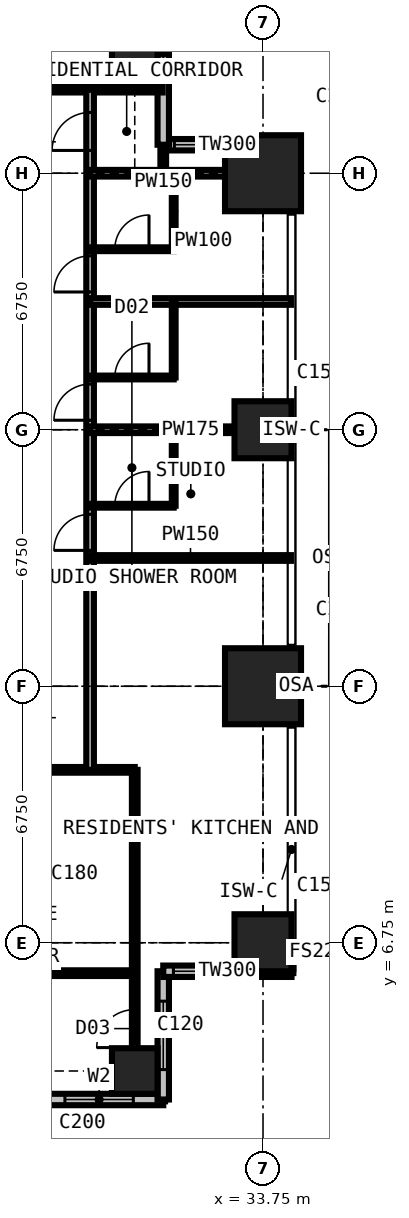
"""IFC4 building model, lengths in metres.
Left out: names, types, materials, properties, quantities, classifications, styles, units other than length and angle.
Written with IfcOpenShell. Run it as: python <this file> out.ifc"""

import sys

from ifc_helpers import new_model, si_unit, direction, frame, frame_2d, origin, origin_2d, place, context, subcontext, project, spatial, rectangle, extrude, element, fill, save


model = new_model("IFC4")
c1 = context("Model", 3, precision=1e-05, world=origin(), true_north=direction((0.0, 1.0)))
c2 = subcontext(c1, "Body", "Model", "MODEL_VIEW")
j1 = project(units=[si_unit("LENGTHUNIT", "METRE"), si_unit("PLANEANGLEUNIT", "RADIAN")], contexts=[c1])
p1 = place(None, origin())
s1 = spatial("IfcSite", under=j1, at=p1, CompositionType="ELEMENT")
p2 = place(p1, origin())
s2 = spatial("IfcBuilding", under=s1, at=p2, CompositionType="ELEMENT")
p3 = place(p2, frame((0.0, 0.0, 145.8)))
s3 = spatial("IfcBuildingStorey", under=s2, at=p3, CompositionType="ELEMENT", Elevation=145.8)
for number, where, z_axis, x_axis in (
    (1, (30.375, 3.375, 0.0), (0.0, 0.0, 1.0), (1.0, 0.0, 0.0)),
    (2, (30.375, 30.375, 0.0), (0.0, 0.0, 1.0), (1.0, 0.0, 0.0)),
):
    element("IfcColumn", number, at=place(p3, frame(where, z_axis=z_axis, x_axis=x_axis)), inside=s3, PredefinedType="COLUMN", context=c2, shape_type="SweptSolid", body=[
        extrude(rectangle(XDim=1.2, YDim=1.2, at=origin_2d()), origin(), (0.0, 0.0, 1.0), 3.6),
    ])
p4 = place(p3, frame((33.75, 6.75, 0.0), z_axis=(0.0, 0.0, 1.0), x_axis=(1.0, 0.0, 0.0)))
e3 = element("IfcColumn", 3, at=p4, inside=s3, PredefinedType="COLUMN", context=c2, shape_type="SweptSolid", body=[
    extrude(rectangle(XDim=1.5, YDim=1.5, at=origin_2d()), origin(), (0.0, 0.0, 1.0), 3.6),
])
p5 = place(p3, frame((33.75, 13.5, 0.0), z_axis=(0.0, 0.0, 1.0), x_axis=(1.0, 0.0, 0.0)))
e4 = element("IfcColumn", 4, at=p5, inside=s3, PredefinedType="COLUMN", context=c2, shape_type="SweptSolid", body=[
    extrude(rectangle(XDim=2.0, YDim=2.0, at=origin_2d()), origin(), (0.0, 0.0, 1.0), 3.6),
])
p6 = place(p3, frame((33.75, 20.25, 0.0), z_axis=(0.0, 0.0, 1.0), x_axis=(1.0, 0.0, 0.0)))
e5 = element("IfcColumn", 5, at=p6, inside=s3, PredefinedType="COLUMN", context=c2, shape_type="SweptSolid", body=[
    extrude(rectangle(XDim=1.5, YDim=1.5, at=origin_2d()), origin(), (0.0, 0.0, 1.0), 3.6),
])
p7 = place(p3, frame((33.75, 27.0, 0.0), z_axis=(0.0, 0.0, 1.0), x_axis=(1.0, 0.0, 0.0)))
e6 = element("IfcColumn", 6, at=p7, inside=s3, PredefinedType="COLUMN", context=c2, shape_type="SweptSolid", body=[
    extrude(rectangle(XDim=2.0, YDim=2.0, at=origin_2d()), origin(), (0.0, 0.0, 1.0), 3.6),
])
p8 = place(p3, frame((34.5, 27.75, 0.0), z_axis=(0.0, 0.0, 1.0), x_axis=(-1.0, 0.0, 0.0)))
e7 = element("IfcWall", 7, at=p8, inside=s3, PredefinedType="SOLIDWALL", context=c2, shape_type="SweptSolid", body=[
    extrude(rectangle(XDim=3.375, YDim=0.3, at=frame_2d((1.688, 0.0))), origin(), (0.0, 0.0, 1.0), 3.375),
])
p9 = place(p8, frame((1.883, 0.0, 0.9)))
e8 = element("IfcOpeningElement", 8, at=p9, cuts=e7, PredefinedType="OPENING", context=c2, shape_type="SweptSolid", body=[
    extrude(rectangle(XDim=1.2, YDim=1.8, at=frame_2d((0.6, 0.9))), frame((0.0, 0.16, 0.0), z_axis=(0.0, -1.0, 0.0), x_axis=(1.0, 0.0, 0.0)), (0.0, 0.0, 1.0), 0.32),
])
p10 = place(p3, frame((31.125, 27.75, 0.0), z_axis=(0.0, 0.0, 1.0), x_axis=(0.0, 1.0, 0.0)))
e9 = element("IfcWall", 9, at=p10, inside=s3, PredefinedType="SOLIDWALL", context=c2, shape_type="SweptSolid", body=[
    extrude(rectangle(XDim=3.375, YDim=0.3, at=frame_2d((1.688, 0.0))), origin(), (0.0, 0.0, 1.0), 3.375),
])
p11 = place(p10, frame((1.663, 0.0, 0.9)))
e10 = element("IfcOpeningElement", 10, at=p11, cuts=e9, PredefinedType="OPENING", context=c2, shape_type="SweptSolid", body=[
    extrude(rectangle(XDim=1.5, YDim=1.8, at=frame_2d((0.75, 0.9))), frame((0.0, 0.16, 0.0), z_axis=(0.0, -1.0, 0.0), x_axis=(1.0, 0.0, 0.0)), (0.0, 0.0, 1.0), 0.32),
])
p12 = place(p3, frame((27.75, 2.625, 0.0), z_axis=(0.0, 0.0, 1.0), x_axis=(1.0, 0.0, 0.0)))
e11 = element("IfcWall", 11, at=p12, inside=s3, PredefinedType="SOLIDWALL", context=c2, shape_type="SweptSolid", body=[
    extrude(rectangle(XDim=3.375, YDim=0.3, at=frame_2d((1.688, 0.0))), origin(), (0.0, 0.0, 1.0), 3.375),
])
p13 = place(p12, frame((0.788, 0.0, 0.6)))
e12 = element("IfcOpeningElement", 12, at=p13, cuts=e11, PredefinedType="OPENING", context=c2, shape_type="SweptSolid", body=[
    extrude(rectangle(XDim=1.8, YDim=2.1, at=frame_2d((0.9, 1.05))), frame((0.0, 0.16, 0.0), z_axis=(0.0, -1.0, 0.0), x_axis=(1.0, 0.0, 0.0)), (0.0, 0.0, 1.0), 0.32),
])
p14 = place(p3, frame((31.125, 2.625, 0.0), z_axis=(0.0, 0.0, 1.0), x_axis=(0.0, 1.0, 0.0)))
e13 = element("IfcWall", 13, at=p14, inside=s3, PredefinedType="SOLIDWALL", context=c2, shape_type="SweptSolid", body=[
    extrude(rectangle(XDim=3.375, YDim=0.3, at=frame_2d((1.688, 0.0))), origin(), (0.0, 0.0, 1.0), 3.375),
])
p15 = place(p14, frame((0.788, 0.0, 0.6)))
e14 = element("IfcOpeningElement", 14, at=p15, cuts=e13, PredefinedType="OPENING", context=c2, shape_type="SweptSolid", body=[
    extrude(rectangle(XDim=1.8, YDim=2.1, at=frame_2d((0.9, 1.05))), frame((0.0, 0.16, 0.0), z_axis=(0.0, -1.0, 0.0), x_axis=(1.0, 0.0, 0.0)), (0.0, 0.0, 1.0), 0.32),
])
p16 = place(p3, frame((31.125, 6.0, 0.0), z_axis=(0.0, 0.0, 1.0), x_axis=(1.0, 0.0, 0.0)))
e15 = element("IfcWall", 15, at=p16, inside=s3, PredefinedType="SOLIDWALL", context=c2, shape_type="SweptSolid", body=[
    extrude(rectangle(XDim=3.375, YDim=0.3, at=frame_2d((1.688, 0.0))), origin(), (0.0, 0.0, 1.0), 3.375),
])
p17 = place(p16, frame((0.268, 0.0, 0.9)))
e16 = element("IfcOpeningElement", 16, at=p17, cuts=e15, PredefinedType="OPENING", context=c2, shape_type="SweptSolid", body=[
    extrude(rectangle(XDim=1.5, YDim=1.8, at=frame_2d((0.75, 0.9))), frame((0.0, 0.16, 0.0), z_axis=(0.0, -1.0, 0.0), x_axis=(1.0, 0.0, 0.0)), (0.0, 0.0, 1.0), 0.32),
])
p18 = place(p3, frame((10.125, 11.3, 0.0), z_axis=(0.0, 0.0, 1.0), x_axis=(1.0, 0.0, 0.0)))
e17 = element("IfcWall", 17, at=p18, inside=s3, PredefinedType="PARTITIONING", context=c2, shape_type="SweptSolid", body=[
    extrude(rectangle(XDim=20.25, YDim=0.15, at=frame_2d((10.125, 0.0))), origin(), (0.0, 0.0, 1.0), 3.375),
])
p19 = place(p18, frame((8.375, 0.0, 0.0)))
e18 = element("IfcOpeningElement", 18, at=p19, cuts=e17, PredefinedType="OPENING", context=c2, shape_type="SweptSolid", body=[
    extrude(rectangle(XDim=1.0, YDim=2.2, at=frame_2d((0.5, 1.1))), frame((0.0, 0.085, 0.0), z_axis=(0.0, -1.0, 0.0), x_axis=(1.0, 0.0, 0.0)), (0.0, 0.0, 1.0), 0.17),
])
p20 = place(p18, frame((10.975, 0.0, 0.0)))
e19 = element("IfcOpeningElement", 19, at=p20, cuts=e17, PredefinedType="OPENING", context=c2, shape_type="SweptSolid", body=[
    extrude(rectangle(XDim=1.0, YDim=2.2, at=frame_2d((0.5, 1.1))), frame((0.0, 0.085, 0.0), z_axis=(0.0, -1.0, 0.0), x_axis=(1.0, 0.0, 0.0)), (0.0, 0.0, 1.0), 0.17),
])
p21 = place(p18, frame((4.875, 0.0, 0.0)))
e20 = element("IfcOpeningElement", 20, at=p21, cuts=e17, PredefinedType="OPENING", context=c2, shape_type="SweptSolid", body=[
    extrude(rectangle(XDim=0.95, YDim=2.2, at=frame_2d((0.475, 1.1))), frame((0.0, 0.085, 0.0), z_axis=(0.0, -1.0, 0.0), x_axis=(1.0, 0.0, 0.0)), (0.0, 0.0, 1.0), 0.17),
])
p22 = place(p3, frame((11.3, 29.2, 0.0), z_axis=(0.0, 0.0, 1.0), x_axis=(1.0, 0.0, 0.0)))
e21 = element("IfcWall", 21, at=p22, inside=s3, PredefinedType="PARTITIONING", context=c2, shape_type="SweptSolid", body=[
    extrude(rectangle(XDim=19.809, YDim=0.15, at=frame_2d((9.904, 0.0))), origin(), (0.0, 0.0, 1.0), 3.375),
])
p23 = place(p22, frame((12.9, 0.0, 0.0)))
e22 = element("IfcOpeningElement", 22, at=p23, cuts=e21, PredefinedType="OPENING", context=c2, shape_type="SweptSolid", body=[
    extrude(rectangle(XDim=1.0, YDim=2.2, at=frame_2d((0.5, 1.1))), frame((0.0, 0.085, 0.0), z_axis=(0.0, -1.0, 0.0), x_axis=(1.0, 0.0, 0.0)), (0.0, 0.0, 1.0), 0.17),
])
p24 = place(p22, frame((5.825, 0.0, 0.0)))
e23 = element("IfcOpeningElement", 23, at=p24, cuts=e21, PredefinedType="OPENING", context=c2, shape_type="SweptSolid", body=[
    extrude(rectangle(XDim=0.95, YDim=2.2, at=frame_2d((0.475, 1.1))), frame((0.0, 0.085, 0.0), z_axis=(0.0, -1.0, 0.0), x_axis=(1.0, 0.0, 0.0)), (0.0, 0.0, 1.0), 0.17),
])
p25 = place(p22, frame((0.6, 0.0, 0.0)))
e24 = element("IfcOpeningElement", 24, at=p25, cuts=e21, PredefinedType="OPENING", context=c2, shape_type="SweptSolid", body=[
    extrude(rectangle(XDim=1.0, YDim=2.2, at=frame_2d((0.5, 1.1))), frame((0.0, 0.085, 0.0), z_axis=(0.0, -1.0, 0.0), x_axis=(1.0, 0.0, 0.0)), (0.0, 0.0, 1.0), 0.17),
])
p26 = place(p3, frame((27.725, 5.95, 0.0), z_axis=(0.0, 0.0, 1.0), x_axis=(1.0, 0.0, 0.0)))
e25 = element("IfcWall", 25, at=p26, inside=s3, PredefinedType="PARTITIONING", context=c2, shape_type="SweptSolid", body=[
    extrude(rectangle(XDim=2.65, YDim=0.15, at=frame_2d((1.325, 0.0))), origin(), (0.0, 0.0, 1.0), 3.375),
])
p27 = place(p3, frame((29.2, 11.3, 0.0), z_axis=(0.0, 0.0, 1.0), x_axis=(0.0, 1.0, 0.0)))
e26 = element("IfcWall", 26, at=p27, inside=s3, PredefinedType="PARTITIONING", context=c2, shape_type="SweptSolid", body=[
    extrude(rectangle(XDim=17.9, YDim=0.2, at=frame_2d((8.95, 0.0))), origin(), (0.0, 0.0, 1.0), 3.375),
])
p28 = place(p27, frame((5.775, 0.0, 0.0)))
e27 = element("IfcOpeningElement", 27, at=p28, cuts=e26, PredefinedType="OPENING", context=c2, shape_type="SweptSolid", body=[
    extrude(rectangle(XDim=0.95, YDim=2.2, at=frame_2d((0.475, 1.1))), frame((0.0, 0.11, 0.0), z_axis=(0.0, -1.0, 0.0), x_axis=(1.0, 0.0, 0.0)), (0.0, 0.0, 1.0), 0.22),
])
p29 = place(p27, frame((9.2, 0.0, 0.0)))
e28 = element("IfcOpeningElement", 28, at=p29, cuts=e26, PredefinedType="OPENING", context=c2, shape_type="SweptSolid", body=[
    extrude(rectangle(XDim=0.95, YDim=2.2, at=frame_2d((0.475, 1.1))), frame((0.0, 0.11, 0.0), z_axis=(0.0, -1.0, 0.0), x_axis=(1.0, 0.0, 0.0)), (0.0, 0.0, 1.0), 0.22),
])
p30 = place(p27, frame((12.575, 0.0, 0.0)))
e29 = element("IfcOpeningElement", 29, at=p30, cuts=e26, PredefinedType="OPENING", context=c2, shape_type="SweptSolid", body=[
    extrude(rectangle(XDim=0.95, YDim=2.2, at=frame_2d((0.475, 1.1))), frame((0.0, 0.11, 0.0), z_axis=(0.0, -1.0, 0.0), x_axis=(1.0, 0.0, 0.0)), (0.0, 0.0, 1.0), 0.22),
])
p31 = place(p27, frame((16.3, 0.0, 0.0)))
e30 = element("IfcOpeningElement", 30, at=p31, cuts=e26, PredefinedType="OPENING", context=c2, shape_type="SweptSolid", body=[
    extrude(rectangle(XDim=1.0, YDim=2.2, at=frame_2d((0.5, 1.1))), frame((0.0, 0.11, 0.0), z_axis=(0.0, -1.0, 0.0), x_axis=(1.0, 0.0, 0.0)), (0.0, 0.0, 1.0), 0.22),
])
p32 = place(p3, frame((29.2, 16.875, 0.0), z_axis=(0.0, 0.0, 1.0), x_axis=(1.0, 0.0, 0.0)))
e31 = element("IfcWall", 31, at=p32, inside=s3, PredefinedType="PARTITIONING", context=c2, shape_type="SweptSolid", body=[
    extrude(rectangle(XDim=5.284, YDim=0.15, at=frame_2d((2.642, 0.0))), origin(), (0.0, 0.0, 1.0), 3.375),
])
p33 = place(p3, frame((29.2, 18.25, 0.0), z_axis=(0.0, 0.0, 1.0), x_axis=(1.0, 0.0, 0.0)))
e32 = element("IfcWall", 32, at=p33, inside=s3, PredefinedType="PARTITIONING", context=c2, shape_type="SweptSolid", body=[
    extrude(rectangle(XDim=2.2, YDim=0.1, at=frame_2d((1.1, 0.0))), origin(), (0.0, 0.0, 1.0), 3.375),
])
p34 = place(p33, frame((0.65, 0.0, 0.0)))
e33 = element("IfcOpeningElement", 33, at=p34, cuts=e32, PredefinedType="OPENING", context=c2, shape_type="SweptSolid", body=[
    extrude(rectangle(XDim=0.9, YDim=2.2, at=frame_2d((0.45, 1.1))), frame((0.0, 0.06, 0.0), z_axis=(0.0, -1.0, 0.0), x_axis=(1.0, 0.0, 0.0)), (0.0, 0.0, 1.0), 0.12),
])
p35 = place(p3, frame((29.2, 20.25, 0.0), z_axis=(0.0, 0.0, 1.0), x_axis=(1.0, 0.0, 0.0)))
e34 = element("IfcWall", 34, at=p35, inside=s3, PredefinedType="PARTITIONING", context=c2, shape_type="SweptSolid", body=[
    extrude(rectangle(XDim=5.284, YDim=0.175, at=frame_2d((2.642, 0.0))), origin(), (0.0, 0.0, 1.0), 2.61),
])
p36 = place(p3, frame((29.2, 21.625, 0.0), z_axis=(0.0, 0.0, 1.0), x_axis=(1.0, 0.0, 0.0)))
e35 = element("IfcWall", 35, at=p36, inside=s3, PredefinedType="PARTITIONING", context=c2, shape_type="SweptSolid", body=[
    extrude(rectangle(XDim=2.2, YDim=0.1, at=frame_2d((1.1, 0.0))), origin(), (0.0, 0.0, 1.0), 3.375),
])
p37 = place(p36, frame((0.65, 0.0, 0.0)))
e36 = element("IfcOpeningElement", 36, at=p37, cuts=e35, PredefinedType="OPENING", context=c2, shape_type="SweptSolid", body=[
    extrude(rectangle(XDim=0.9, YDim=2.2, at=frame_2d((0.45, 1.1))), frame((0.0, 0.06, 0.0), z_axis=(0.0, -1.0, 0.0), x_axis=(1.0, 0.0, 0.0)), (0.0, 0.0, 1.0), 0.12),
])
p38 = place(p3, frame((29.2, 23.625, 0.0), z_axis=(0.0, 0.0, 1.0), x_axis=(1.0, 0.0, 0.0)))
e37 = element("IfcWall", 37, at=p38, inside=s3, PredefinedType="PARTITIONING", context=c2, shape_type="SweptSolid", body=[
    extrude(rectangle(XDim=5.284, YDim=0.175, at=frame_2d((2.642, 0.0))), origin(), (0.0, 0.0, 1.0), 3.375),
])
p39 = place(p3, frame((29.2, 25.0, 0.0), z_axis=(0.0, 0.0, 1.0), x_axis=(1.0, 0.0, 0.0)))
e38 = element("IfcWall", 38, at=p39, inside=s3, PredefinedType="PARTITIONING", context=c2, shape_type="SweptSolid", body=[
    extrude(rectangle(XDim=2.2, YDim=0.1, at=frame_2d((1.1, 0.0))), origin(), (0.0, 0.0, 1.0), 3.375),
])
p40 = place(p39, frame((0.65, 0.0, 0.0)))
e39 = element("IfcOpeningElement", 39, at=p40, cuts=e38, PredefinedType="OPENING", context=c2, shape_type="SweptSolid", body=[
    extrude(rectangle(XDim=0.9, YDim=2.2, at=frame_2d((0.45, 1.1))), frame((0.0, 0.06, 0.0), z_axis=(0.0, -1.0, 0.0), x_axis=(1.0, 0.0, 0.0)), (0.0, 0.0, 1.0), 0.12),
])
p41 = place(p3, frame((29.2, 27.0, 0.0), z_axis=(0.0, 0.0, 1.0), x_axis=(1.0, 0.0, 0.0)))
e40 = element("IfcWall", 40, at=p41, inside=s3, PredefinedType="PARTITIONING", context=c2, shape_type="SweptSolid", body=[
    extrude(rectangle(XDim=5.284, YDim=0.175, at=frame_2d((2.642, 0.0))), origin(), (0.0, 0.0, 1.0), 2.806),
])
p42 = place(p3, frame((30.375, 2.775, 0.0), z_axis=(0.0, 0.0, 1.0), x_axis=(0.0, 1.0, 0.0)))
e41 = element("IfcWall", 41, at=p42, inside=s3, PredefinedType="PARTITIONING", context=c2, shape_type="SweptSolid", body=[
    extrude(rectangle(XDim=8.525, YDim=0.15, at=frame_2d((4.263, 0.0))), origin(), (0.0, 0.0, 1.0), 2.877),
])
p43 = place(p42, frame((1.216, 0.0, 0.0)))
e42 = element("IfcOpeningElement", 42, at=p43, cuts=e41, PredefinedType="OPENING", context=c2, shape_type="SweptSolid", body=[
    extrude(rectangle(XDim=1.0, YDim=2.2, at=frame_2d((0.5, 1.1))), frame((0.0, 0.085, 0.0), z_axis=(0.0, -1.0, 0.0), x_axis=(1.0, 0.0, 0.0)), (0.0, 0.0, 1.0), 0.17),
])
p44 = place(p3, frame((31.125, 27.0, 0.0), z_axis=(0.0, 0.0, 1.0), x_axis=(0.0, 1.0, 0.0)))
e43 = element("IfcWall", 43, at=p44, inside=s3, PredefinedType="PARTITIONING", context=c2, shape_type="SweptSolid", body=[
    extrude(rectangle(XDim=0.734, YDim=0.15, at=frame_2d((0.367, 0.0))), origin(), (0.0, 0.0, 1.0), 3.375),
])
for number, where, z_axis, x_axis in (
    (44, (31.4, 18.25, 0.0), (0.0, 0.0, 1.0), (0.0, 1.0, 0.0)),
    (45, (31.4, 21.625, 0.0), (0.0, 0.0, 1.0), (0.0, 1.0, 0.0)),
    (46, (31.4, 25.0, 0.0), (0.0, 0.0, 1.0), (0.0, 1.0, 0.0)),
):
    element("IfcWall", number, at=place(p3, frame(where, z_axis=z_axis, x_axis=x_axis)), inside=s3, PredefinedType="PARTITIONING", context=c2, shape_type="SweptSolid", body=[
        extrude(rectangle(XDim=2.0, YDim=0.1, at=frame_2d((1.0, 0.0))), origin(), (0.0, 0.0, 1.0), 3.375),
    ])
p45 = place(p9, origin())
e47 = element("IfcWindow", 47, at=p45, inside=s3, PartitioningType="SINGLE_PANEL", PredefinedType="WINDOW", context=c2, shape_type="SweptSolid", body=[
    extrude(rectangle(XDim=1.2, YDim=1.8, at=frame_2d((0.6, 0.9))), frame((0.0, 0.03, 0.0), z_axis=(0.0, -1.0, 0.0), x_axis=(1.0, 0.0, 0.0)), (0.0, 0.0, 1.0), 0.06),
])
fill(e8, e47)
p46 = place(p11, origin())
e48 = element("IfcWindow", 48, at=p46, inside=s3, PartitioningType="SINGLE_PANEL", PredefinedType="WINDOW", context=c2, shape_type="SweptSolid", body=[
    extrude(rectangle(XDim=1.5, YDim=1.8, at=frame_2d((0.75, 0.9))), frame((0.0, 0.03, 0.0), z_axis=(0.0, -1.0, 0.0), x_axis=(1.0, 0.0, 0.0)), (0.0, 0.0, 1.0), 0.06),
])
fill(e10, e48)
p47 = place(p13, origin())
e49 = element("IfcWindow", 49, at=p47, inside=s3, PartitioningType="SINGLE_PANEL", PredefinedType="WINDOW", context=c2, shape_type="SweptSolid", body=[
    extrude(rectangle(XDim=1.8, YDim=2.1, at=frame_2d((0.9, 1.05))), frame((0.0, 0.03, 0.0), z_axis=(0.0, -1.0, 0.0), x_axis=(1.0, 0.0, 0.0)), (0.0, 0.0, 1.0), 0.06),
])
fill(e12, e49)
p48 = place(p15, origin())
e50 = element("IfcWindow", 50, at=p48, inside=s3, PartitioningType="SINGLE_PANEL", PredefinedType="WINDOW", context=c2, shape_type="SweptSolid", body=[
    extrude(rectangle(XDim=1.8, YDim=2.1, at=frame_2d((0.9, 1.05))), frame((0.0, 0.03, 0.0), z_axis=(0.0, -1.0, 0.0), x_axis=(1.0, 0.0, 0.0)), (0.0, 0.0, 1.0), 0.06),
])
fill(e14, e50)
p49 = place(p17, origin())
e51 = element("IfcWindow", 51, at=p49, inside=s3, PartitioningType="SINGLE_PANEL", PredefinedType="WINDOW", context=c2, shape_type="SweptSolid", body=[
    extrude(rectangle(XDim=1.5, YDim=1.8, at=frame_2d((0.75, 0.9))), frame((0.0, 0.03, 0.0), z_axis=(0.0, -1.0, 0.0), x_axis=(1.0, 0.0, 0.0)), (0.0, 0.0, 1.0), 0.06),
])
fill(e16, e51)
p50 = place(p43, origin())
e52 = element("IfcDoor", 52, at=p50, inside=s3, OperationType="SINGLE_SWING_LEFT", PredefinedType="DOOR", context=c2, shape_type="SweptSolid", body=[
    extrude(rectangle(XDim=1.0, YDim=2.2, at=frame_2d((0.5, 1.1))), frame((0.0, 0.025, 0.0), z_axis=(0.0, -1.0, 0.0), x_axis=(1.0, 0.0, 0.0)), (0.0, 0.0, 1.0), 0.05),
])
fill(e42, e52)
p51 = place(p28, origin())
e53 = element("IfcDoor", 53, at=p51, inside=s3, OperationType="SINGLE_SWING_LEFT", PredefinedType="DOOR", context=c2, shape_type="SweptSolid", body=[
    extrude(rectangle(XDim=0.95, YDim=2.2, at=frame_2d((0.475, 1.1))), frame((0.0, 0.025, 0.0), z_axis=(0.0, -1.0, 0.0), x_axis=(1.0, 0.0, 0.0)), (0.0, 0.0, 1.0), 0.05),
])
fill(e27, e53)
p52 = place(p34, origin())
e54 = element("IfcDoor", 54, at=p52, inside=s3, OperationType="SINGLE_SWING_RIGHT", PredefinedType="DOOR", context=c2, shape_type="SweptSolid", body=[
    extrude(rectangle(XDim=0.9, YDim=2.2, at=frame_2d((0.45, 1.1))), frame((0.0, 0.025, 0.0), z_axis=(0.0, -1.0, 0.0), x_axis=(1.0, 0.0, 0.0)), (0.0, 0.0, 1.0), 0.05),
])
fill(e33, e54)
p53 = place(p29, origin())
e55 = element("IfcDoor", 55, at=p53, inside=s3, OperationType="SINGLE_SWING_LEFT", PredefinedType="DOOR", context=c2, shape_type="SweptSolid", body=[
    extrude(rectangle(XDim=0.95, YDim=2.2, at=frame_2d((0.475, 1.1))), frame((0.0, 0.025, 0.0), z_axis=(0.0, -1.0, 0.0), x_axis=(1.0, 0.0, 0.0)), (0.0, 0.0, 1.0), 0.05),
])
fill(e28, e55)
p54 = place(p37, origin())
e56 = element("IfcDoor", 56, at=p54, inside=s3, OperationType="SINGLE_SWING_RIGHT", PredefinedType="DOOR", context=c2, shape_type="SweptSolid", body=[
    extrude(rectangle(XDim=0.9, YDim=2.2, at=frame_2d((0.45, 1.1))), frame((0.0, 0.025, 0.0), z_axis=(0.0, -1.0, 0.0), x_axis=(1.0, 0.0, 0.0)), (0.0, 0.0, 1.0), 0.05),
])
fill(e36, e56)
p55 = place(p30, origin())
e57 = element("IfcDoor", 57, at=p55, inside=s3, OperationType="SINGLE_SWING_LEFT", PredefinedType="DOOR", context=c2, shape_type="SweptSolid", body=[
    extrude(rectangle(XDim=0.95, YDim=2.2, at=frame_2d((0.475, 1.1))), frame((0.0, 0.025, 0.0), z_axis=(0.0, -1.0, 0.0), x_axis=(1.0, 0.0, 0.0)), (0.0, 0.0, 1.0), 0.05),
])
fill(e29, e57)
p56 = place(p40, origin())
e58 = element("IfcDoor", 58, at=p56, inside=s3, OperationType="SINGLE_SWING_RIGHT", PredefinedType="DOOR", context=c2, shape_type="SweptSolid", body=[
    extrude(rectangle(XDim=0.9, YDim=2.2, at=frame_2d((0.45, 1.1))), frame((0.0, 0.025, 0.0), z_axis=(0.0, -1.0, 0.0), x_axis=(1.0, 0.0, 0.0)), (0.0, 0.0, 1.0), 0.05),
])
fill(e39, e58)
p57 = place(p31, origin())
e59 = element("IfcDoor", 59, at=p57, inside=s3, OperationType="SINGLE_SWING_LEFT", PredefinedType="DOOR", context=c2, shape_type="SweptSolid", body=[
    extrude(rectangle(XDim=1.0, YDim=2.2, at=frame_2d((0.5, 1.1))), frame((0.0, 0.025, 0.0), z_axis=(0.0, -1.0, 0.0), x_axis=(1.0, 0.0, 0.0)), (0.0, 0.0, 1.0), 0.05),
])
fill(e30, e59)
save(model, sys.argv[1])
